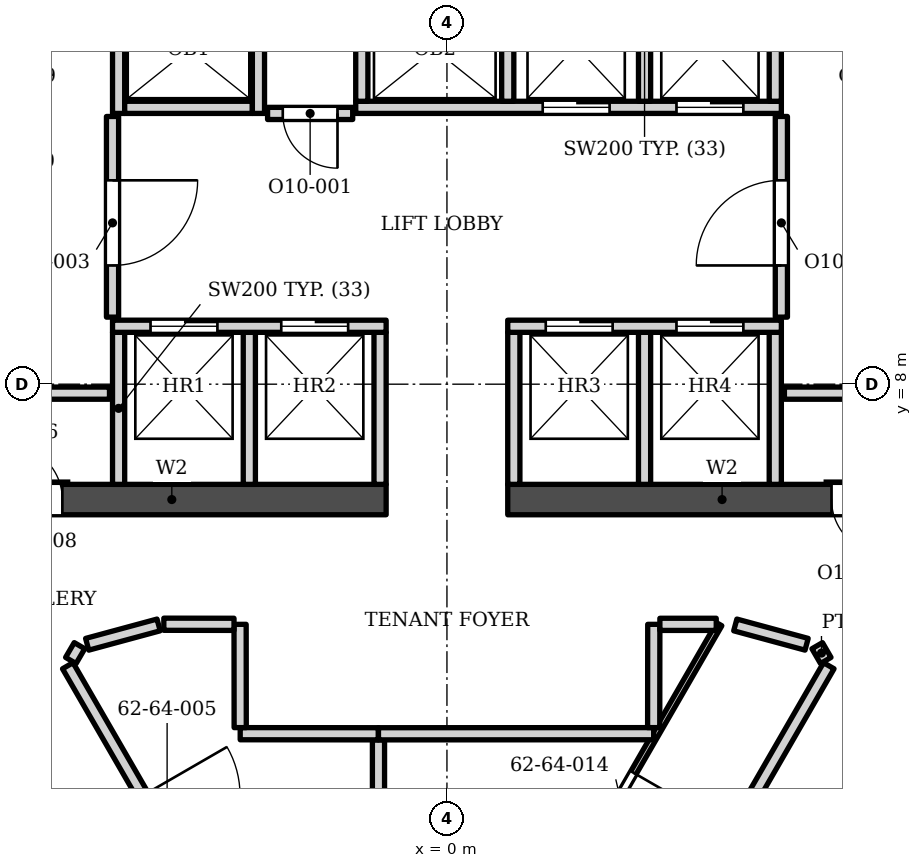
"""IFC4 building model, lengths in metres.
Left out: names, types, materials, properties, quantities, classifications, styles, units other than length and angle.
Written with IfcOpenShell. Run it as: python <this file> out.ifc"""

import sys

from ifc_helpers import new_model, si_unit, direction, frame, frame_2d, origin, place, context, subcontext, project, spatial, rectangle, extrude, element, fill, save


model = new_model("IFC4")
c1 = context("Model", 3, precision=1e-05, world=origin(), true_north=direction((0.0, 1.0)))
c2 = subcontext(c1, "Body", "Model", "MODEL_VIEW")
j1 = project(units=[si_unit("LENGTHUNIT", "METRE"), si_unit("PLANEANGLEUNIT", "RADIAN")], contexts=[c1])
p1 = place(None, origin())
s1 = spatial("IfcSite", under=j1, at=p1, CompositionType="ELEMENT")
p2 = place(p1, origin())
s2 = spatial("IfcBuilding", under=s1, at=p2, CompositionType="ELEMENT")
p3 = place(p2, frame((0.0, 0.0, 259.9)))
s3 = spatial("IfcBuildingStorey", under=s2, at=p3, CompositionType="ELEMENT", Elevation=259.9)
p4 = place(p3, frame((-8.05, 6.103, 0.0), z_axis=(0.0, 0.0, 1.0), x_axis=(1.0, 0.0, 0.0)))
e1 = element("IfcWall", 1, at=p4, inside=s3, PredefinedType="SHEAR", context=c2, shape_type="SweptSolid", body=[
    extrude(rectangle(XDim=7.05, YDim=0.5, at=frame_2d((3.525, 0.0))), origin(), (0.0, 0.0, 1.0), 3.9),
])
p5 = place(p4, frame((0.825, 0.0, 0.0)))
e2 = element("IfcOpeningElement", 2, at=p5, cuts=e1, PredefinedType="OPENING", context=c2, shape_type="SweptSolid", body=[
    extrude(rectangle(XDim=0.9, YDim=2.1, at=frame_2d((0.45, 1.05))), frame((0.0, 0.26, 0.0), z_axis=(0.0, -1.0, 0.0), x_axis=(1.0, 0.0, 0.0)), (0.0, 0.0, 1.0), 0.52),
])
p6 = place(p3, frame((1.0, 6.103, 0.0), z_axis=(0.0, 0.0, 1.0), x_axis=(1.0, 0.0, 0.0)))
e3 = element("IfcWall", 3, at=p6, inside=s3, PredefinedType="SHEAR", context=c2, shape_type="SweptSolid", body=[
    extrude(rectangle(XDim=7.05, YDim=0.5, at=frame_2d((3.525, 0.0))), origin(), (0.0, 0.0, 1.0), 3.9),
])
p7 = place(p6, frame((5.325, 0.0, 0.0)))
e4 = element("IfcOpeningElement", 4, at=p7, cuts=e3, PredefinedType="OPENING", context=c2, shape_type="SweptSolid", body=[
    extrude(rectangle(XDim=0.9, YDim=2.1, at=frame_2d((0.45, 1.05))), frame((0.0, 0.26, 0.0), z_axis=(0.0, -1.0, 0.0), x_axis=(1.0, 0.0, 0.0)), (0.0, 0.0, 1.0), 0.52),
])
for number, where, z_axis, x_axis in (
    (5, (-5.4, 6.353, 0.0), (0.0, 0.0, 1.0), (0.0, 1.0, 0.0)),
    (6, (-3.25, 6.353, 0.0), (0.0, 0.0, 1.0), (0.0, 1.0, 0.0)),
    (7, (-1.1, 6.353, 0.0), (0.0, 0.0, 1.0), (0.0, 1.0, 0.0)),
    (8, (1.1, 6.353, 0.0), (0.0, 0.0, 1.0), (0.0, 1.0, 0.0)),
    (9, (3.25, 6.353, 0.0), (0.0, 0.0, 1.0), (0.0, 1.0, 0.0)),
    (10, (5.4, 6.353, 0.0), (0.0, 0.0, 1.0), (0.0, 1.0, 0.0)),
    (11, (-8.05, 7.853, 0.0), (0.0, 0.0, 1.0), (1.0, 0.0, 0.0)),
    (12, (5.55, 7.853, 0.0), (0.0, 0.0, 1.0), (1.0, 0.0, 0.0)),
):
    element("IfcWall", number, at=place(p3, frame(where, z_axis=z_axis, x_axis=x_axis)), inside=s3, PredefinedType="SOLIDWALL", context=c2, shape_type="SweptSolid", body=[
        extrude(rectangle(XDim=2.5, YDim=0.2, at=frame_2d((1.25, 0.0))), origin(), (0.0, 0.0, 1.0), 3.73),
    ])
p8 = place(p3, frame((-5.5, 8.953, 0.0), z_axis=(0.0, 0.0, 1.0), x_axis=(1.0, 0.0, 0.0)))
e13 = element("IfcWall", 13, at=p8, inside=s3, PredefinedType="SOLIDWALL", context=c2, shape_type="SweptSolid", body=[
    extrude(rectangle(XDim=4.5, YDim=0.2, at=frame_2d((2.25, 0.0))), origin(), (0.0, 0.0, 1.0), 3.73),
])
p9 = place(p8, frame((0.625, 0.0, 0.0)))
e14 = element("IfcOpeningElement", 14, at=p9, cuts=e13, PredefinedType="OPENING", context=c2, shape_type="SweptSolid", body=[
    extrude(rectangle(XDim=1.1, YDim=2.1, at=frame_2d((0.55, 1.05))), frame((0.0, 0.11, 0.0), z_axis=(0.0, -1.0, 0.0), x_axis=(1.0, 0.0, 0.0)), (0.0, 0.0, 1.0), 0.22),
])
p10 = place(p8, frame((2.775, 0.0, 0.0)))
e15 = element("IfcOpeningElement", 15, at=p10, cuts=e13, PredefinedType="OPENING", context=c2, shape_type="SweptSolid", body=[
    extrude(rectangle(XDim=1.1, YDim=2.1, at=frame_2d((0.55, 1.05))), frame((0.0, 0.11, 0.0), z_axis=(0.0, -1.0, 0.0), x_axis=(1.0, 0.0, 0.0)), (0.0, 0.0, 1.0), 0.22),
])
p11 = place(p3, frame((1.0, 8.953, 0.0), z_axis=(0.0, 0.0, 1.0), x_axis=(1.0, 0.0, 0.0)))
e16 = element("IfcWall", 16, at=p11, inside=s3, PredefinedType="SOLIDWALL", context=c2, shape_type="SweptSolid", body=[
    extrude(rectangle(XDim=4.5, YDim=0.2, at=frame_2d((2.25, 0.0))), origin(), (0.0, 0.0, 1.0), 3.73),
])
p12 = place(p11, frame((0.625, 0.0, 0.0)))
e17 = element("IfcOpeningElement", 17, at=p12, cuts=e16, PredefinedType="OPENING", context=c2, shape_type="SweptSolid", body=[
    extrude(rectangle(XDim=1.1, YDim=2.1, at=frame_2d((0.55, 1.05))), frame((0.0, 0.11, 0.0), z_axis=(0.0, -1.0, 0.0), x_axis=(1.0, 0.0, 0.0)), (0.0, 0.0, 1.0), 0.22),
])
p13 = place(p11, frame((2.775, 0.0, 0.0)))
e18 = element("IfcOpeningElement", 18, at=p13, cuts=e16, PredefinedType="OPENING", context=c2, shape_type="SweptSolid", body=[
    extrude(rectangle(XDim=1.1, YDim=2.1, at=frame_2d((0.55, 1.05))), frame((0.0, 0.11, 0.0), z_axis=(0.0, -1.0, 0.0), x_axis=(1.0, 0.0, 0.0)), (0.0, 0.0, 1.0), 0.22),
])
p14 = place(p3, frame((-5.5, 9.103, 0.0), z_axis=(0.0, 0.0, 1.0), x_axis=(0.0, 1.0, 0.0)))
e19 = element("IfcWall", 19, at=p14, inside=s3, PredefinedType="SOLIDWALL", context=c2, shape_type="SweptSolid", body=[
    extrude(rectangle(XDim=3.3, YDim=0.2, at=frame_2d((1.65, 0.0))), origin(), (0.0, 0.0, 1.0), 3.73),
])
p15 = place(p14, frame((0.85, 0.0, 0.0)))
e20 = element("IfcOpeningElement", 20, at=p15, cuts=e19, PredefinedType="OPENING", context=c2, shape_type="SweptSolid", body=[
    extrude(rectangle(XDim=1.4, YDim=2.1, at=frame_2d((0.7, 1.05))), frame((0.0, 0.11, 0.0), z_axis=(0.0, -1.0, 0.0), x_axis=(1.0, 0.0, 0.0)), (0.0, 0.0, 1.0), 0.22),
])
p16 = place(p3, frame((5.5, 9.103, 0.0), z_axis=(0.0, 0.0, 1.0), x_axis=(0.0, 1.0, 0.0)))
e21 = element("IfcWall", 21, at=p16, inside=s3, PredefinedType="SOLIDWALL", context=c2, shape_type="SweptSolid", body=[
    extrude(rectangle(XDim=3.3, YDim=0.2, at=frame_2d((1.65, 0.0))), origin(), (0.0, 0.0, 1.0), 3.73),
])
p17 = place(p16, frame((0.85, 0.0, 0.0)))
e22 = element("IfcOpeningElement", 22, at=p17, cuts=e21, PredefinedType="OPENING", context=c2, shape_type="SweptSolid", body=[
    extrude(rectangle(XDim=1.4, YDim=2.1, at=frame_2d((0.7, 1.05))), frame((0.0, 0.11, 0.0), z_axis=(0.0, -1.0, 0.0), x_axis=(1.0, 0.0, 0.0)), (0.0, 0.0, 1.0), 0.22),
])
p18 = place(p3, frame((-2.95, 12.453, 0.0), z_axis=(0.0, 0.0, 1.0), x_axis=(1.0, 0.0, 0.0)))
e23 = element("IfcWall", 23, at=p18, inside=s3, PredefinedType="SOLIDWALL", context=c2, shape_type="SweptSolid", body=[
    extrude(rectangle(XDim=1.4, YDim=0.2, at=frame_2d((0.7, 0.0))), origin(), (0.0, 0.0, 1.0), 3.73),
])
p19 = place(p18, frame((0.25, 0.0, 0.0)))
e24 = element("IfcOpeningElement", 24, at=p19, cuts=e23, PredefinedType="OPENING", context=c2, shape_type="SweptSolid", body=[
    extrude(rectangle(XDim=0.9, YDim=2.1, at=frame_2d((0.45, 1.05))), frame((0.0, 0.11, 0.0), z_axis=(0.0, -1.0, 0.0), x_axis=(1.0, 0.0, 0.0)), (0.0, 0.0, 1.0), 0.22),
])
p20 = place(p3, frame((-5.4, 12.453, 0.0), z_axis=(0.0, 0.0, 1.0), x_axis=(0.0, 1.0, 0.0)))
e25 = element("IfcWall", 25, at=p20, inside=s3, PredefinedType="SOLIDWALL", context=c2, shape_type="SweptSolid", body=[
    extrude(rectangle(XDim=3.0, YDim=0.2, at=frame_2d((1.5, 0.0))), origin(), (0.0, 0.0, 1.0), 3.73),
])
p21 = place(p3, frame((-5.3, 12.552, 0.0), z_axis=(0.0, 0.0, 1.0), x_axis=(1.0, 0.0, 0.0)))
e26 = element("IfcWall", 26, at=p21, inside=s3, PredefinedType="SOLIDWALL", context=c2, shape_type="SweptSolid", body=[
    extrude(rectangle(XDim=2.1, YDim=0.2, at=frame_2d((1.05, 0.0))), origin(), (0.0, 0.0, 1.0), 3.73),
])
p22 = place(p3, frame((-3.1, 12.453, 0.0), z_axis=(0.0, 0.0, 1.0), x_axis=(0.0, 1.0, 0.0)))
e27 = element("IfcWall", 27, at=p22, inside=s3, PredefinedType="SOLIDWALL", context=c2, shape_type="SweptSolid", body=[
    extrude(rectangle(XDim=3.0, YDim=0.2, at=frame_2d((1.5, 0.0))), origin(), (0.0, 0.0, 1.0), 3.73),
])
p23 = place(p3, frame((-1.5, 12.552, 0.0), z_axis=(0.0, 0.0, 1.0), x_axis=(1.0, 0.0, 0.0)))
e28 = element("IfcWall", 28, at=p23, inside=s3, PredefinedType="SOLIDWALL", context=c2, shape_type="SweptSolid", body=[
    extrude(rectangle(XDim=7.0, YDim=0.2, at=frame_2d((3.5, 0.0))), origin(), (0.0, 0.0, 1.0), 3.73),
])
p24 = place(p23, frame((3.075, 0.0, 0.0)))
e29 = element("IfcOpeningElement", 29, at=p24, cuts=e28, PredefinedType="OPENING", context=c2, shape_type="SweptSolid", body=[
    extrude(rectangle(XDim=1.1, YDim=2.1, at=frame_2d((0.55, 1.05))), frame((0.0, 0.11, 0.0), z_axis=(0.0, -1.0, 0.0), x_axis=(1.0, 0.0, 0.0)), (0.0, 0.0, 1.0), 0.22),
])
p25 = place(p23, frame((5.275, 0.0, 0.0)))
e30 = element("IfcOpeningElement", 30, at=p25, cuts=e28, PredefinedType="OPENING", context=c2, shape_type="SweptSolid", body=[
    extrude(rectangle(XDim=1.1, YDim=2.1, at=frame_2d((0.55, 1.05))), frame((0.0, 0.11, 0.0), z_axis=(0.0, -1.0, 0.0), x_axis=(1.0, 0.0, 0.0)), (0.0, 0.0, 1.0), 0.22),
])
for number, where, z_axis, x_axis in (
    (31, (-1.4, 12.653, 0.0), (0.0, 0.0, 1.0), (0.0, 1.0, 0.0)),
    (32, (1.0, 12.653, 0.0), (0.0, 0.0, 1.0), (0.0, 1.0, 0.0)),
    (33, (3.25, 12.653, 0.0), (0.0, 0.0, 1.0), (0.0, 1.0, 0.0)),
):
    element("IfcWall", number, at=place(p3, frame(where, z_axis=z_axis, x_axis=x_axis)), inside=s3, PredefinedType="SOLIDWALL", context=c2, shape_type="SweptSolid", body=[
        extrude(rectangle(XDim=2.6, YDim=0.2, at=frame_2d((1.3, 0.0))), origin(), (0.0, 0.0, 1.0), 3.73),
    ])
p26 = place(p3, frame((5.4, 12.653, 0.0), z_axis=(0.0, 0.0, 1.0), x_axis=(0.0, 1.0, 0.0)))
e34 = element("IfcWall", 34, at=p26, inside=s3, PredefinedType="SOLIDWALL", context=c2, shape_type="SweptSolid", body=[
    extrude(rectangle(XDim=1.6, YDim=0.2, at=frame_2d((0.8, 0.0))), origin(), (0.0, 0.0, 1.0), 3.73),
])
p27 = place(p3, frame((-7.433, 1.839, 0.0), z_axis=(0.0, 0.0, 1.0), x_axis=(0.500005992518, -0.866021943975, 0.0)))
e35 = element("IfcWall", 35, at=p27, inside=s3, PredefinedType="PARTITIONING", context=c2, shape_type="SweptSolid", body=[
    extrude(rectangle(XDim=13.764, YDim=0.2, at=frame_2d((6.882, 0.0))), origin(), (0.0, 0.0, 1.0), 2.884),
])
p28 = place(p27, frame((3.7, 0.0, 0.0)))
e36 = element("IfcOpeningElement", 36, at=p28, cuts=e35, PredefinedType="OPENING", context=c2, shape_type="SweptSolid", body=[
    extrude(rectangle(XDim=1.6, YDim=2.1, at=frame_2d((0.8, 1.05))), frame((0.0, 0.11, 0.0), z_axis=(0.0, -1.0, 0.0), x_axis=(1.0, 0.0, 0.0)), (0.0, 0.0, 1.0), 0.22),
])
p29 = place(p27, frame((10.85, 0.0, 0.0)))
e37 = element("IfcOpeningElement", 37, at=p29, cuts=e35, PredefinedType="OPENING", context=c2, shape_type="SweptSolid", body=[
    extrude(rectangle(XDim=0.8, YDim=2.1, at=frame_2d((0.4, 1.05))), frame((0.0, 0.11, 0.0), z_axis=(0.0, -1.0, 0.0), x_axis=(1.0, 0.0, 0.0)), (0.0, 0.0, 1.0), 0.22),
])
p30 = place(p3, frame((0.212, -7.139, 0.0), z_axis=(0.0, 0.0, 1.0), x_axis=(0.499990649477, 0.866030802244, 0.0)))
e38 = element("IfcWall", 38, at=p30, inside=s3, PredefinedType="PARTITIONING", context=c2, shape_type="SweptSolid", body=[
    extrude(rectangle(XDim=12.135, YDim=0.2, at=frame_2d((6.067, 0.0))), origin(), (0.0, 0.0, 1.0), 2.884),
])
p31 = place(p30, frame((5.567, 0.0, 0.0)))
e39 = element("IfcOpeningElement", 39, at=p31, cuts=e38, PredefinedType="OPENING", context=c2, shape_type="SweptSolid", body=[
    extrude(rectangle(XDim=1.0, YDim=2.1, at=frame_2d((0.5, 1.05))), frame((0.0, 0.11, 0.0), z_axis=(0.0, -1.0, 0.0), x_axis=(1.0, 0.0, 0.0)), (0.0, 0.0, 1.0), 0.22),
])
p32 = place(p3, frame((-1.017, -5.465, 0.0), z_axis=(0.0, 0.0, 1.0), x_axis=(0.499983334908, 0.866035025166, 0.0)))
e40 = element("IfcWall", 40, at=p32, inside=s3, PredefinedType="PARTITIONING", context=c2, shape_type="SweptSolid", body=[
    extrude(rectangle(XDim=10.99, YDim=0.1, at=frame_2d((5.495, 0.0))), origin(), (0.0, 0.0, 1.0), 2.884),
])
p33 = place(p32, frame((1.915, 0.0, 0.0)))
e41 = element("IfcOpeningElement", 41, at=p33, cuts=e40, PredefinedType="OPENING", context=c2, shape_type="SweptSolid", body=[
    extrude(rectangle(XDim=0.9, YDim=2.1, at=frame_2d((0.45, 1.05))), frame((0.0, 0.06, 0.0), z_axis=(0.0, -1.0, 0.0), x_axis=(1.0, 0.0, 0.0)), (0.0, 0.0, 1.0), 0.12),
])
p34 = place(p32, frame((7.271, 0.0, 0.0)))
e42 = element("IfcOpeningElement", 42, at=p34, cuts=e40, PredefinedType="OPENING", context=c2, shape_type="SweptSolid", body=[
    extrude(rectangle(XDim=0.9, YDim=2.1, at=frame_2d((0.45, 1.05))), frame((0.0, 0.06, 0.0), z_axis=(0.0, -1.0, 0.0), x_axis=(1.0, 0.0, 0.0)), (0.0, 0.0, 1.0), 0.12),
])
p35 = place(p3, frame((6.295, -0.204, 0.0), z_axis=(0.0, 0.0, 1.0), x_axis=(0.499964815505, 0.866045716609, 0.0)))
e43 = element("IfcWall", 43, at=p35, inside=s3, PredefinedType="PARTITIONING", context=c2, shape_type="SweptSolid", body=[
    extrude(rectangle(XDim=4.331, YDim=0.2, at=frame_2d((2.166, 0.0))), origin(), (0.0, 0.0, 1.0), 3.73),
])
p36 = place(p35, frame((1.397, 0.0, 0.0)))
e44 = element("IfcOpeningElement", 44, at=p36, cuts=e43, PredefinedType="OPENING", context=c2, shape_type="SweptSolid", body=[
    extrude(rectangle(XDim=0.9, YDim=2.1, at=frame_2d((0.45, 1.05))), frame((0.0, 0.11, 0.0), z_axis=(0.0, -1.0, 0.0), x_axis=(1.0, 0.0, 0.0)), (0.0, 0.0, 1.0), 0.22),
])
p37 = place(p3, frame((-1.126, 0.247, 0.0), z_axis=(0.0, 0.0, 1.0), x_axis=(0.0, 1.0, 0.0)))
e45 = element("IfcWall", 45, at=p37, inside=s3, PredefinedType="PARTITIONING", context=c2, shape_type="SweptSolid", body=[
    extrude(rectangle(XDim=1.903, YDim=0.2, at=frame_2d((0.952, 0.0))), origin(), (0.0, 0.0, 1.0), 3.73),
])
p38 = place(p3, frame((-3.4, 2.252, 0.0), z_axis=(0.0, 0.0, 1.0), x_axis=(0.999999630572, -0.000859567749, 0.0)))
e46 = element("IfcWall", 46, at=p38, inside=s3, PredefinedType="PARTITIONING", context=c2, shape_type="SweptSolid", body=[
    extrude(rectangle(XDim=2.272, YDim=0.2, at=frame_2d((1.136, 0.0))), origin(), (0.0, 0.0, 1.0), 3.73),
])
p39 = place(p3, frame((-1.126, 2.25, 0.0), z_axis=(0.0, 0.0, 1.0), x_axis=(0.999999906884, 0.000431545973, 0.0)))
e47 = element("IfcWall", 47, at=p39, inside=s3, PredefinedType="PARTITIONING", context=c2, shape_type="SweptSolid", body=[
    extrude(rectangle(XDim=4.526, YDim=0.2, at=frame_2d((2.263, 0.0))), origin(), (0.0, 0.0, 1.0), 3.73),
])
p40 = place(p3, frame((-3.402, 4.051, 0.0), z_axis=(0.0, 0.0, 1.0), x_axis=(0.001150085496, -0.999999338651, 0.0)))
e48 = element("IfcWall", 48, at=p40, inside=s3, PredefinedType="PARTITIONING", context=c2, shape_type="SweptSolid", body=[
    extrude(rectangle(XDim=1.698, YDim=0.2, at=frame_2d((0.849, 0.0))), origin(), (0.0, 0.0, 1.0), 3.73),
])
p41 = place(p3, frame((-6.236, 3.37, 0.0), z_axis=(0.0, 0.0, 1.0), x_axis=(0.500224030226, -0.865896021231, 0.0)))
e49 = element("IfcWall", 49, at=p41, inside=s3, PredefinedType="PARTITIONING", context=c2, shape_type="SweptSolid", body=[
    extrude(rectangle(XDim=6.53, YDim=0.2, at=frame_2d((3.265, 0.0))), origin(), (0.0, 0.0, 1.0), 2.884),
])
p42 = place(p41, frame((2.466, 0.0, 0.0)))
e50 = element("IfcOpeningElement", 50, at=p42, cuts=e49, PredefinedType="OPENING", context=c2, shape_type="SweptSolid", body=[
    extrude(rectangle(XDim=1.6, YDim=2.1, at=frame_2d((0.8, 1.05))), frame((0.0, 0.11, 0.0), z_axis=(0.0, -1.0, 0.0), x_axis=(1.0, 0.0, 0.0)), (0.0, 0.0, 1.0), 0.22),
])
p43 = place(p3, frame((6.09, 3.7, 0.0), z_axis=(0.0, 0.0, 1.0), x_axis=(0.499973348067, -0.866040790738, 0.0)))
e51 = element("IfcWall", 51, at=p43, inside=s3, PredefinedType="PARTITIONING", context=c2, shape_type="SweptSolid", body=[
    extrude(rectangle(XDim=0.281, YDim=0.2, at=frame_2d((0.14, 0.0))), origin(), (0.0, 0.0, 1.0), 3.73),
])
p44 = place(p3, frame((-6.186, 3.456, 0.0), z_axis=(0.0, 0.0, 1.0), x_axis=(0.504408873088, 0.863464931975, 0.0)))
e52 = element("IfcWall", 52, at=p44, inside=s3, PredefinedType="PARTITIONING", context=c2, shape_type="SweptSolid", body=[
    extrude(rectangle(XDim=0.282, YDim=0.2, at=frame_2d((0.141, 0.0))), origin(), (0.0, 0.0, 1.0), 3.73),
])
p45 = place(p3, frame((4.742, 4.041, 0.0), z_axis=(0.0, 0.0, 1.0), x_axis=(0.965129144807, -0.261774203931, 0.0)))
e53 = element("IfcWall", 53, at=p45, inside=s3, PredefinedType="PARTITIONING", context=c2, shape_type="SweptSolid", body=[
    extrude(rectangle(XDim=1.215, YDim=0.2, at=frame_2d((0.608, 0.0))), origin(), (0.0, 0.0, 1.0), 2.884),
])
p46 = place(p3, frame((-5.917, 3.723, 0.0), z_axis=(0.0, 0.0, 1.0), x_axis=(0.965160943547, 0.26165693771, 0.0)))
e54 = element("IfcWall", 54, at=p46, inside=s3, PredefinedType="PARTITIONING", context=c2, shape_type="SweptSolid", body=[
    extrude(rectangle(XDim=1.217, YDim=0.2, at=frame_2d((0.608, 0.0))), origin(), (0.0, 0.0, 1.0), 2.884),
])
p47 = place(p3, frame((-4.656, 4.052, 0.0), z_axis=(0.0, 0.0, 1.0), x_axis=(0.999998904, -0.001480539832, 0.0)))
e55 = element("IfcWall", 55, at=p47, inside=s3, PredefinedType="PARTITIONING", context=c2, shape_type="SweptSolid", body=[
    extrude(rectangle(XDim=1.154, YDim=0.2, at=frame_2d((0.577, 0.0))), origin(), (0.0, 0.0, 1.0), 3.73),
])
p48 = place(p3, frame((3.4, 2.352, 0.0), z_axis=(0.0, 0.0, 1.0), x_axis=(0.001150085496, 0.999999338651, 0.0)))
e56 = element("IfcWall", 56, at=p48, inside=s3, PredefinedType="PARTITIONING", context=c2, shape_type="SweptSolid", body=[
    extrude(rectangle(XDim=1.698, YDim=0.2, at=frame_2d((0.849, 0.0))), origin(), (0.0, 0.0, 1.0), 3.73),
])
p49 = place(p3, frame((3.502, 4.051, 0.0), z_axis=(0.0, 0.0, 1.0), x_axis=(1.0, 0.0, 0.0)))
e57 = element("IfcWall", 57, at=p49, inside=s3, PredefinedType="PARTITIONING", context=c2, shape_type="SweptSolid", body=[
    extrude(rectangle(XDim=0.927, YDim=0.2, at=frame_2d((0.463, 0.0))), origin(), (0.0, 0.0, 1.0), 2.884),
])
p50 = place(p9, origin())
e58 = element("IfcDoor", 58, at=p50, inside=s3, OperationType="DOUBLE_DOOR_SLIDING", PredefinedType="DOOR", context=c2, shape_type="SweptSolid", body=[
    extrude(rectangle(XDim=1.1, YDim=2.1, at=frame_2d((0.55, 1.05))), frame((0.0, 0.025, 0.0), z_axis=(0.0, -1.0, 0.0), x_axis=(1.0, 0.0, 0.0)), (0.0, 0.0, 1.0), 0.05),
])
fill(e14, e58)
p51 = place(p10, origin())
e59 = element("IfcDoor", 59, at=p51, inside=s3, OperationType="DOUBLE_DOOR_SLIDING", PredefinedType="DOOR", context=c2, shape_type="SweptSolid", body=[
    extrude(rectangle(XDim=1.1, YDim=2.1, at=frame_2d((0.55, 1.05))), frame((0.0, 0.025, 0.0), z_axis=(0.0, -1.0, 0.0), x_axis=(1.0, 0.0, 0.0)), (0.0, 0.0, 1.0), 0.05),
])
fill(e15, e59)
p52 = place(p12, origin())
e60 = element("IfcDoor", 60, at=p52, inside=s3, OperationType="DOUBLE_DOOR_SLIDING", PredefinedType="DOOR", context=c2, shape_type="SweptSolid", body=[
    extrude(rectangle(XDim=1.1, YDim=2.1, at=frame_2d((0.55, 1.05))), frame((0.0, 0.025, 0.0), z_axis=(0.0, -1.0, 0.0), x_axis=(1.0, 0.0, 0.0)), (0.0, 0.0, 1.0), 0.05),
])
fill(e17, e60)
p53 = place(p13, origin())
e61 = element("IfcDoor", 61, at=p53, inside=s3, OperationType="DOUBLE_DOOR_SLIDING", PredefinedType="DOOR", context=c2, shape_type="SweptSolid", body=[
    extrude(rectangle(XDim=1.1, YDim=2.1, at=frame_2d((0.55, 1.05))), frame((0.0, 0.025, 0.0), z_axis=(0.0, -1.0, 0.0), x_axis=(1.0, 0.0, 0.0)), (0.0, 0.0, 1.0), 0.05),
])
fill(e18, e61)
p54 = place(p24, origin())
e62 = element("IfcDoor", 62, at=p54, inside=s3, OperationType="DOUBLE_DOOR_SLIDING", PredefinedType="DOOR", context=c2, shape_type="SweptSolid", body=[
    extrude(rectangle(XDim=1.1, YDim=2.1, at=frame_2d((0.55, 1.05))), frame((0.0, 0.025, 0.0), z_axis=(0.0, -1.0, 0.0), x_axis=(1.0, 0.0, 0.0)), (0.0, 0.0, 1.0), 0.05),
])
fill(e29, e62)
p55 = place(p25, origin())
e63 = element("IfcDoor", 63, at=p55, inside=s3, OperationType="DOUBLE_DOOR_SLIDING", PredefinedType="DOOR", context=c2, shape_type="SweptSolid", body=[
    extrude(rectangle(XDim=1.1, YDim=2.1, at=frame_2d((0.55, 1.05))), frame((0.0, 0.025, 0.0), z_axis=(0.0, -1.0, 0.0), x_axis=(1.0, 0.0, 0.0)), (0.0, 0.0, 1.0), 0.05),
])
fill(e30, e63)
p56 = place(p19, origin())
e64 = element("IfcDoor", 64, at=p56, inside=s3, OperationType="SINGLE_SWING_RIGHT", PredefinedType="DOOR", context=c2, shape_type="SweptSolid", body=[
    extrude(rectangle(XDim=0.9, YDim=2.1, at=frame_2d((0.45, 1.05))), frame((0.0, 0.025, 0.0), z_axis=(0.0, -1.0, 0.0), x_axis=(1.0, 0.0, 0.0)), (0.0, 0.0, 1.0), 0.05),
])
fill(e24, e64)
p57 = place(p15, origin())
e65 = element("IfcDoor", 65, at=p57, inside=s3, OperationType="SINGLE_SWING_RIGHT", PredefinedType="DOOR", context=c2, shape_type="SweptSolid", body=[
    extrude(rectangle(XDim=1.4, YDim=2.1, at=frame_2d((0.7, 1.05))), frame((0.0, 0.025, 0.0), z_axis=(0.0, -1.0, 0.0), x_axis=(1.0, 0.0, 0.0)), (0.0, 0.0, 1.0), 0.05),
])
fill(e20, e65)
p58 = place(p17, origin())
e66 = element("IfcDoor", 66, at=p58, inside=s3, OperationType="SINGLE_SWING_LEFT", PredefinedType="DOOR", context=c2, shape_type="SweptSolid", body=[
    extrude(rectangle(XDim=1.4, YDim=2.1, at=frame_2d((0.7, 1.05))), frame((0.0, 0.025, 0.0), z_axis=(0.0, -1.0, 0.0), x_axis=(1.0, 0.0, 0.0)), (0.0, 0.0, 1.0), 0.05),
])
fill(e22, e66)
p59 = place(p5, origin())
e67 = element("IfcDoor", 67, at=p59, inside=s3, OperationType="SINGLE_SWING_LEFT", PredefinedType="DOOR", context=c2, shape_type="SweptSolid", body=[
    extrude(rectangle(XDim=0.9, YDim=2.1, at=frame_2d((0.45, 1.05))), frame((0.0, 0.025, 0.0), z_axis=(0.0, -1.0, 0.0), x_axis=(1.0, 0.0, 0.0)), (0.0, 0.0, 1.0), 0.05),
])
fill(e2, e67)
p60 = place(p7, origin())
e68 = element("IfcDoor", 68, at=p60, inside=s3, OperationType="SINGLE_SWING_RIGHT", PredefinedType="DOOR", context=c2, shape_type="SweptSolid", body=[
    extrude(rectangle(XDim=0.9, YDim=2.1, at=frame_2d((0.45, 1.05))), frame((0.0, 0.025, 0.0), z_axis=(0.0, -1.0, 0.0), x_axis=(1.0, 0.0, 0.0)), (0.0, 0.0, 1.0), 0.05),
])
fill(e4, e68)
p61 = place(p34, origin())
e69 = element("IfcDoor", 69, at=p61, inside=s3, OperationType="SINGLE_SWING_RIGHT", PredefinedType="DOOR", context=c2, shape_type="SweptSolid", body=[
    extrude(rectangle(XDim=0.9, YDim=2.1, at=frame_2d((0.45, 1.05))), frame((0.0, 0.025, 0.0), z_axis=(0.0, -1.0, 0.0), x_axis=(1.0, 0.0, 0.0)), (0.0, 0.0, 1.0), 0.05),
])
fill(e42, e69)
save(model, sys.argv[1])
